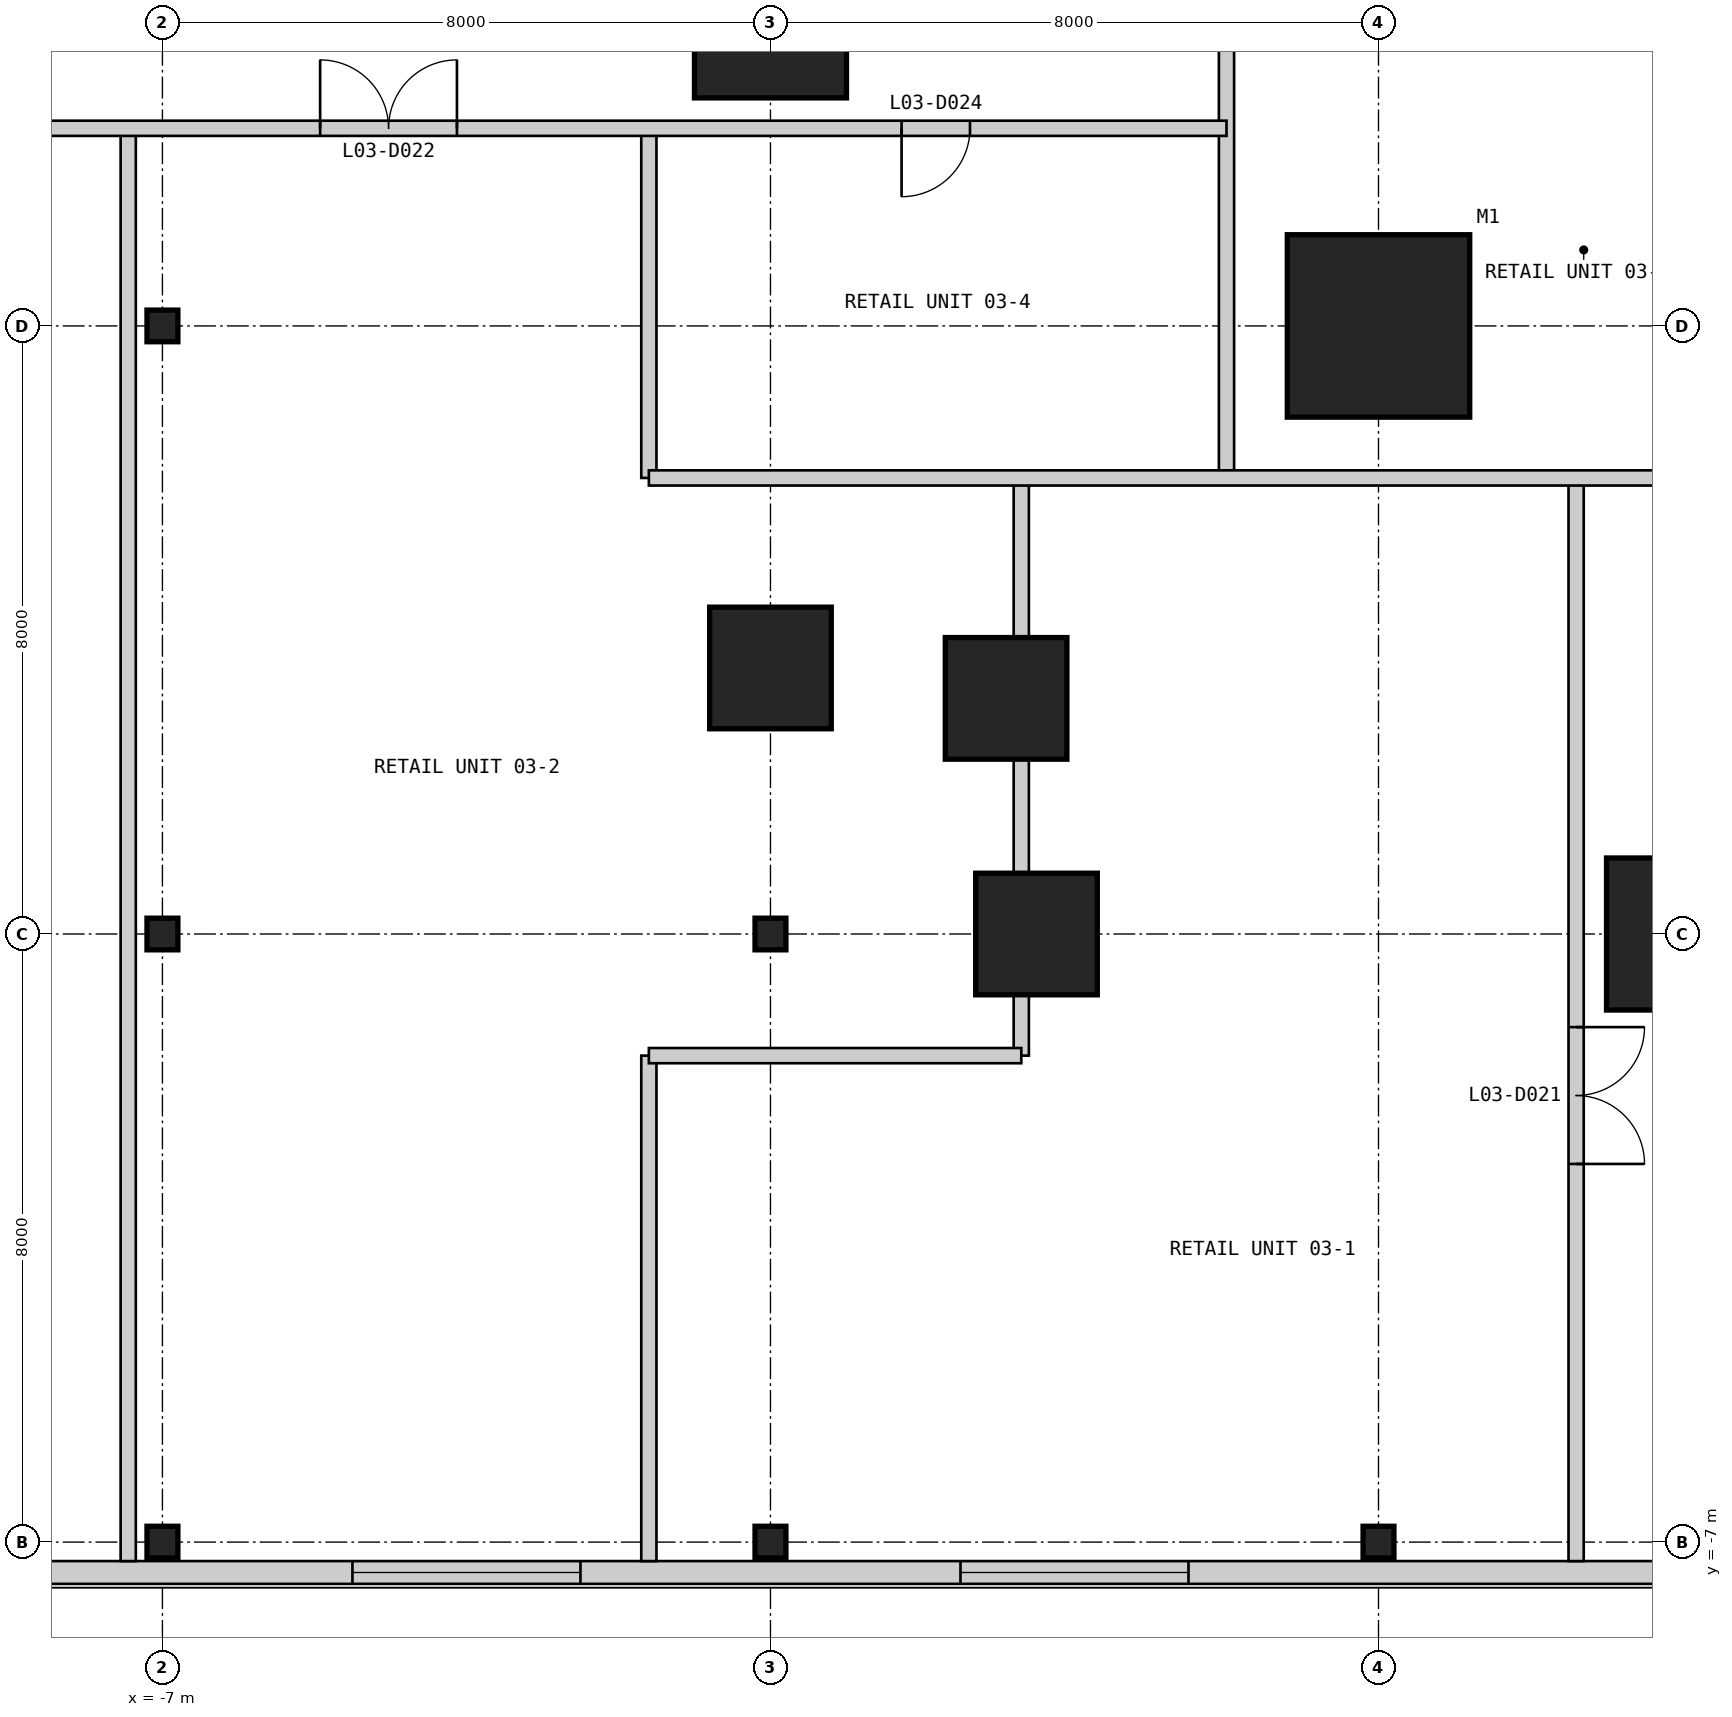
"""IFC4 building model, lengths in metres.
Left out: names, types, materials, properties, quantities, classifications, styles, units other than length and angle.
Written with IfcOpenShell. Run it as: python <this file> out.ifc"""

import sys

from ifc_helpers import new_model, si_unit, direction, frame, frame_2d, origin, origin_2d, place, context, subcontext, project, spatial, rectangle, i_section, extrude, element, fill, save


model = new_model("IFC4")
c1 = context("Model", 3, precision=1e-05, world=origin(), true_north=direction((0.0, 1.0)))
c2 = subcontext(c1, "Body", "Model", "MODEL_VIEW")
j1 = project(units=[si_unit("LENGTHUNIT", "METRE"), si_unit("PLANEANGLEUNIT", "RADIAN")], contexts=[c1])
p1 = place(None, origin())
s1 = spatial("IfcSite", under=j1, at=p1, CompositionType="ELEMENT")
p2 = place(p1, origin())
s2 = spatial("IfcBuilding", under=s1, at=p2, CompositionType="ELEMENT")
p3 = place(p2, frame((0.0, 0.0, 16.6)))
s3 = spatial("IfcBuildingStorey", under=s2, at=p3, CompositionType="ELEMENT", Elevation=16.6)
p4 = place(p3, frame((9.0, 9.0, 0.0), z_axis=(0.0, 0.0, 1.0), x_axis=(1.0, 0.0, 0.0)))
e1 = element("IfcColumn", 1, at=p4, inside=s3, PredefinedType="COLUMN", context=c2, shape_type="SweptSolid", body=[
    extrude(rectangle(XDim=2.4, YDim=2.4, at=origin_2d()), origin(), (0.0, 0.0, 1.0), 4.8),
])
p5 = place(p3, frame((4.5, 1.0, 0.0), z_axis=(0.0, 0.0, 1.0), x_axis=(1.0, 0.0, 0.0)))
e2 = element("IfcColumn", 2, at=p5, inside=s3, PredefinedType="COLUMN", context=c2, shape_type="SweptSolid", body=[
    extrude(rectangle(XDim=1.6, YDim=1.6, at=origin_2d()), origin(), (0.0, 0.0, 1.0), 4.8),
])
for number, where, z_axis, x_axis in (
    (3, (13.0, 1.0, 0.0), (0.0, 0.0, 1.0), (1.0, 0.0, 0.0)),
    (4, (1.0, 13.0, 0.0), (0.0, 0.0, 1.0), (1.0, 0.0, 0.0)),
):
    element("IfcColumn", number, at=place(p3, frame(where, z_axis=z_axis, x_axis=x_axis)), inside=s3, PredefinedType="COLUMN", context=c2, shape_type="SweptSolid", body=[
        extrude(rectangle(XDim=2.0, YDim=2.0, at=origin_2d()), origin(), (0.0, 0.0, 1.0), 4.8),
    ])
for number, where, z_axis, x_axis in (
    (5, (1.0, 4.5, 0.0), (0.0, 0.0, 1.0), (1.0, 0.0, 0.0)),
    (6, (4.1, 4.1, 0.0), (0.0, 0.0, 1.0), (1.0, 0.0, 0.0)),
):
    element("IfcColumn", number, at=place(p3, frame(where, z_axis=z_axis, x_axis=x_axis)), inside=s3, PredefinedType="COLUMN", context=c2, shape_type="SweptSolid", body=[
        extrude(rectangle(XDim=1.6, YDim=1.6, at=origin_2d()), origin(), (0.0, 0.0, 1.0), 4.8),
    ])
for number, where, z_axis, x_axis in (
    (7, (-7.0, -7.0, 0.0), (0.0, 0.0, 1.0), (1.0, 0.0, 0.0)),
    (8, (-7.0, 1.0, 0.0), (0.0, 0.0, 1.0), (1.0, 0.0, 0.0)),
    (9, (-7.0, 9.0, 0.0), (0.0, 0.0, 1.0), (1.0, 0.0, 0.0)),
    (10, (1.0, -7.0, 0.0), (0.0, 0.0, 1.0), (1.0, 0.0, 0.0)),
    (11, (1.0, 1.0, 0.0), (0.0, 0.0, 1.0), (1.0, 0.0, 0.0)),
    (12, (9.0, -7.0, 0.0), (0.0, 0.0, 1.0), (1.0, 0.0, 0.0)),
):
    element("IfcColumn", number, at=place(p3, frame(where, z_axis=z_axis, x_axis=x_axis)), inside=s3, PredefinedType="COLUMN", context=c2, shape_type="SweptSolid", body=[
        extrude(i_section(OverallWidth=0.406, OverallDepth=0.417, WebThickness=0.03, FlangeThickness=0.048, at=origin_2d()), origin(), (0.0, 0.0, 1.0), 4.8),
    ])
p6 = place(p3, frame((-15.55, -7.4, 0.0), z_axis=(0.0, 0.0, 1.0), x_axis=(1.0, 0.0, 0.0)))
e13 = element("IfcWall", 13, at=p6, inside=s3, PredefinedType="SOLIDWALL", context=c2, shape_type="SweptSolid", body=[
    extrude(rectangle(XDim=73.1, YDim=0.3, at=frame_2d((36.55, 0.0))), origin(), (0.0, 0.0, 1.0), 4.5),
])
p7 = place(p6, frame((3.05, 0.0, 0.9)))
e14 = element("IfcOpeningElement", 14, at=p7, cuts=e13, PredefinedType="OPENING", context=c2, shape_type="SweptSolid", body=[
    extrude(rectangle(XDim=3.0, YDim=2.4, at=frame_2d((1.5, 1.2))), frame((0.0, 0.16, 0.0), z_axis=(0.0, -1.0, 0.0), x_axis=(1.0, 0.0, 0.0)), (0.0, 0.0, 1.0), 0.32),
])
p8 = place(p6, frame((11.05, 0.0, 0.9)))
e15 = element("IfcOpeningElement", 15, at=p8, cuts=e13, PredefinedType="OPENING", context=c2, shape_type="SweptSolid", body=[
    extrude(rectangle(XDim=3.0, YDim=2.4, at=frame_2d((1.5, 1.2))), frame((0.0, 0.16, 0.0), z_axis=(0.0, -1.0, 0.0), x_axis=(1.0, 0.0, 0.0)), (0.0, 0.0, 1.0), 0.32),
])
p9 = place(p6, frame((19.05, 0.0, 0.9)))
e16 = element("IfcOpeningElement", 16, at=p9, cuts=e13, PredefinedType="OPENING", context=c2, shape_type="SweptSolid", body=[
    extrude(rectangle(XDim=3.0, YDim=2.4, at=frame_2d((1.5, 1.2))), frame((0.0, 0.16, 0.0), z_axis=(0.0, -1.0, 0.0), x_axis=(1.0, 0.0, 0.0)), (0.0, 0.0, 1.0), 0.32),
])
p10 = place(p6, frame((33.05, 0.0, 0.9)))
e17 = element("IfcOpeningElement", 17, at=p10, cuts=e13, PredefinedType="OPENING", context=c2, shape_type="SweptSolid", body=[
    extrude(rectangle(XDim=3.0, YDim=2.4, at=frame_2d((1.5, 1.2))), frame((0.0, 0.16, 0.0), z_axis=(0.0, -1.0, 0.0), x_axis=(1.0, 0.0, 0.0)), (0.0, 0.0, 1.0), 0.32),
])
p11 = place(p6, frame((45.05, 0.0, 0.9)))
e18 = element("IfcOpeningElement", 18, at=p11, cuts=e13, PredefinedType="OPENING", context=c2, shape_type="SweptSolid", body=[
    extrude(rectangle(XDim=3.0, YDim=2.4, at=frame_2d((1.5, 1.2))), frame((0.0, 0.16, 0.0), z_axis=(0.0, -1.0, 0.0), x_axis=(1.0, 0.0, 0.0)), (0.0, 0.0, 1.0), 0.32),
])
p12 = place(p6, frame((53.55, 0.0, 0.9)))
e19 = element("IfcOpeningElement", 19, at=p12, cuts=e13, PredefinedType="OPENING", context=c2, shape_type="SweptSolid", body=[
    extrude(rectangle(XDim=3.0, YDim=2.4, at=frame_2d((1.5, 1.2))), frame((0.0, 0.16, 0.0), z_axis=(0.0, -1.0, 0.0), x_axis=(1.0, 0.0, 0.0)), (0.0, 0.0, 1.0), 0.32),
])
p13 = place(p6, frame((59.55, 0.0, 0.9)))
e20 = element("IfcOpeningElement", 20, at=p13, cuts=e13, PredefinedType="OPENING", context=c2, shape_type="SweptSolid", body=[
    extrude(rectangle(XDim=3.0, YDim=2.4, at=frame_2d((1.5, 1.2))), frame((0.0, 0.16, 0.0), z_axis=(0.0, -1.0, 0.0), x_axis=(1.0, 0.0, 0.0)), (0.0, 0.0, 1.0), 0.32),
])
p14 = place(p6, frame((67.05, 0.0, 0.9)))
e21 = element("IfcOpeningElement", 21, at=p14, cuts=e13, PredefinedType="OPENING", context=c2, shape_type="SweptSolid", body=[
    extrude(rectangle(XDim=3.0, YDim=2.4, at=frame_2d((1.5, 1.2))), frame((0.0, 0.16, 0.0), z_axis=(0.0, -1.0, 0.0), x_axis=(1.0, 0.0, 0.0)), (0.0, 0.0, 1.0), 0.32),
])
p15 = place(p3, frame((-7.45, -7.25, 0.0), z_axis=(0.0, 0.0, 1.0), x_axis=(0.0, 1.0, 0.0)))
e22 = element("IfcWall", 22, at=p15, inside=s3, PredefinedType="PARTITIONING", context=c2, shape_type="SweptSolid", body=[
    extrude(rectangle(XDim=18.85, YDim=0.2, at=frame_2d((9.425, 0.0))), origin(), (0.0, 0.0, 1.0), 4.5),
])
p16 = place(p3, frame((-0.6, -7.25, 0.0), z_axis=(0.0, 0.0, 1.0), x_axis=(0.0, 1.0, 0.0)))
e23 = element("IfcWall", 23, at=p16, inside=s3, PredefinedType="PARTITIONING", context=c2, shape_type="SweptSolid", body=[
    extrude(rectangle(XDim=6.65, YDim=0.2, at=frame_2d((3.325, 0.0))), origin(), (0.0, 0.0, 1.0), 4.5),
])
p17 = place(p3, frame((-0.6, 7.0, 0.0), z_axis=(0.0, 0.0, 1.0), x_axis=(0.0, 1.0, 0.0)))
e24 = element("IfcWall", 24, at=p17, inside=s3, PredefinedType="PARTITIONING", context=c2, shape_type="SweptSolid", body=[
    extrude(rectangle(XDim=4.6, YDim=0.2, at=frame_2d((2.3, 0.0))), origin(), (0.0, 0.0, 1.0), 4.5),
])
p18 = place(p3, frame((4.3, -0.6, 0.0), z_axis=(0.0, 0.0, 1.0), x_axis=(0.0, 1.0, 0.0)))
e25 = element("IfcWall", 25, at=p18, inside=s3, PredefinedType="PARTITIONING", context=c2, shape_type="SweptSolid", body=[
    extrude(rectangle(XDim=0.8, YDim=0.2, at=frame_2d((0.4, 0.0))), origin(), (0.0, 0.0, 1.0), 4.5),
])
p19 = place(p3, frame((4.3, 1.8, 0.0), z_axis=(0.0, 0.0, 1.0), x_axis=(0.0, 1.0, 0.0)))
e26 = element("IfcWall", 26, at=p19, inside=s3, PredefinedType="PARTITIONING", context=c2, shape_type="SweptSolid", body=[
    extrude(rectangle(XDim=1.5, YDim=0.2, at=frame_2d((0.75, 0.0))), origin(), (0.0, 0.0, 1.0), 3.65),
])
p20 = place(p3, frame((4.3, 4.9, 0.0), z_axis=(0.0, 0.0, 1.0), x_axis=(0.0, 1.0, 0.0)))
e27 = element("IfcWall", 27, at=p20, inside=s3, PredefinedType="PARTITIONING", context=c2, shape_type="SweptSolid", body=[
    extrude(rectangle(XDim=2.1, YDim=0.2, at=frame_2d((1.05, 0.0))), origin(), (0.0, 0.0, 1.0), 4.5),
])
p21 = place(p3, frame((7.0, 7.0, 0.0), z_axis=(0.0, 0.0, 1.0), x_axis=(0.0, 1.0, 0.0)))
e28 = element("IfcWall", 28, at=p21, inside=s3, PredefinedType="PARTITIONING", context=c2, shape_type="SweptSolid", body=[
    extrude(rectangle(XDim=6.0, YDim=0.2, at=frame_2d((3.0, 0.0))), origin(), (0.0, 0.0, 1.0), 4.5),
])
p22 = place(p3, frame((11.6, -7.25, 0.0), z_axis=(0.0, 0.0, 1.0), x_axis=(0.0, 1.0, 0.0)))
e29 = element("IfcWall", 29, at=p22, inside=s3, PredefinedType="PARTITIONING", context=c2, shape_type="SweptSolid", body=[
    extrude(rectangle(XDim=14.25, YDim=0.2, at=frame_2d((7.125, 0.0))), origin(), (0.0, 0.0, 1.0), 4.5),
])
p23 = place(p22, frame((5.225, 0.0, 0.0)))
e30 = element("IfcOpeningElement", 30, at=p23, cuts=e29, PredefinedType="OPENING", context=c2, shape_type="SweptSolid", body=[
    extrude(rectangle(XDim=1.8, YDim=2.4, at=frame_2d((0.9, 1.2))), frame((0.0, 0.11, 0.0), z_axis=(0.0, -1.0, 0.0), x_axis=(1.0, 0.0, 0.0)), (0.0, 0.0, 1.0), 0.22),
])
p24 = place(p3, frame((-0.6, -0.6, 0.0), z_axis=(0.0, 0.0, 1.0), x_axis=(1.0, 0.0, 0.0)))
e31 = element("IfcWall", 31, at=p24, inside=s3, PredefinedType="PARTITIONING", context=c2, shape_type="SweptSolid", body=[
    extrude(rectangle(XDim=4.9, YDim=0.2, at=frame_2d((2.45, 0.0))), origin(), (0.0, 0.0, 1.0), 4.5),
])
p25 = place(p3, frame((-0.6, 7.0, 0.0), z_axis=(0.0, 0.0, 1.0), x_axis=(1.0, 0.0, 0.0)))
e32 = element("IfcWall", 32, at=p25, inside=s3, PredefinedType="PARTITIONING", context=c2, shape_type="SweptSolid", body=[
    extrude(rectangle(XDim=17.0, YDim=0.2, at=frame_2d((8.5, 0.0))), origin(), (0.0, 0.0, 1.0), 4.5),
])
p26 = place(p25, frame((14.125, 0.0, 0.0)))
e33 = element("IfcOpeningElement", 33, at=p26, cuts=e32, PredefinedType="OPENING", context=c2, shape_type="SweptSolid", body=[
    extrude(rectangle(XDim=0.9, YDim=2.2, at=frame_2d((0.45, 1.1))), frame((0.0, 0.11, 0.0), z_axis=(0.0, -1.0, 0.0), x_axis=(1.0, 0.0, 0.0)), (0.0, 0.0, 1.0), 0.22),
])
p27 = place(p3, frame((-15.25, 11.6, 0.0), z_axis=(0.0, 0.0, 1.0), x_axis=(1.0, 0.0, 0.0)))
e34 = element("IfcWall", 34, at=p27, inside=s3, PredefinedType="PARTITIONING", context=c2, shape_type="SweptSolid", body=[
    extrude(rectangle(XDim=22.25, YDim=0.2, at=frame_2d((11.125, 0.0))), origin(), (0.0, 0.0, 1.0), 4.5),
])
p28 = place(p27, frame((10.325, 0.0, 0.0)))
e35 = element("IfcOpeningElement", 35, at=p28, cuts=e34, PredefinedType="OPENING", context=c2, shape_type="SweptSolid", body=[
    extrude(rectangle(XDim=1.8, YDim=2.4, at=frame_2d((0.9, 1.2))), frame((0.0, 0.11, 0.0), z_axis=(0.0, -1.0, 0.0), x_axis=(1.0, 0.0, 0.0)), (0.0, 0.0, 1.0), 0.22),
])
p29 = place(p27, frame((3.025, 0.0, 0.0)))
e36 = element("IfcOpeningElement", 36, at=p29, cuts=e34, PredefinedType="OPENING", context=c2, shape_type="SweptSolid", body=[
    extrude(rectangle(XDim=1.8, YDim=2.4, at=frame_2d((0.9, 1.2))), frame((0.0, 0.11, 0.0), z_axis=(0.0, -1.0, 0.0), x_axis=(1.0, 0.0, 0.0)), (0.0, 0.0, 1.0), 0.22),
])
p30 = place(p27, frame((17.975, 0.0, 0.0)))
e37 = element("IfcOpeningElement", 37, at=p30, cuts=e34, PredefinedType="OPENING", context=c2, shape_type="SweptSolid", body=[
    extrude(rectangle(XDim=0.9, YDim=2.2, at=frame_2d((0.45, 1.1))), frame((0.0, 0.11, 0.0), z_axis=(0.0, -1.0, 0.0), x_axis=(1.0, 0.0, 0.0)), (0.0, 0.0, 1.0), 0.22),
])
p31 = place(p8, origin())
e38 = element("IfcWindow", 38, at=p31, inside=s3, PartitioningType="SINGLE_PANEL", PredefinedType="WINDOW", context=c2, shape_type="SweptSolid", body=[
    extrude(rectangle(XDim=3.0, YDim=2.4, at=frame_2d((1.5, 1.2))), frame((0.0, 0.03, 0.0), z_axis=(0.0, -1.0, 0.0), x_axis=(1.0, 0.0, 0.0)), (0.0, 0.0, 1.0), 0.06),
])
fill(e15, e38)
p32 = place(p9, origin())
e39 = element("IfcWindow", 39, at=p32, inside=s3, PartitioningType="SINGLE_PANEL", PredefinedType="WINDOW", context=c2, shape_type="SweptSolid", body=[
    extrude(rectangle(XDim=3.0, YDim=2.4, at=frame_2d((1.5, 1.2))), frame((0.0, 0.03, 0.0), z_axis=(0.0, -1.0, 0.0), x_axis=(1.0, 0.0, 0.0)), (0.0, 0.0, 1.0), 0.06),
])
fill(e16, e39)
p33 = place(p23, frame((1.8, 0.0, 0.0), z_axis=(0.0, 0.0, 1.0), x_axis=(-1.0, 0.0, 0.0)))
e40 = element("IfcDoor", 40, at=p33, inside=s3, OperationType="DOUBLE_DOOR_SINGLE_SWING", PredefinedType="DOOR", context=c2, shape_type="SweptSolid", body=[
    extrude(rectangle(XDim=1.8, YDim=2.4, at=frame_2d((0.9, 1.2))), frame((0.0, 0.025, 0.0), z_axis=(0.0, -1.0, 0.0), x_axis=(1.0, 0.0, 0.0)), (0.0, 0.0, 1.0), 0.05),
])
fill(e30, e40)
p34 = place(p28, origin())
e41 = element("IfcDoor", 41, at=p34, inside=s3, OperationType="DOUBLE_DOOR_SINGLE_SWING", PredefinedType="DOOR", context=c2, shape_type="SweptSolid", body=[
    extrude(rectangle(XDim=1.8, YDim=2.4, at=frame_2d((0.9, 1.2))), frame((0.0, 0.025, 0.0), z_axis=(0.0, -1.0, 0.0), x_axis=(1.0, 0.0, 0.0)), (0.0, 0.0, 1.0), 0.05),
])
fill(e35, e41)
p35 = place(p30, frame((0.9, 0.0, 0.0), z_axis=(0.0, 0.0, 1.0), x_axis=(-1.0, 0.0, 0.0)))
e42 = element("IfcDoor", 42, at=p35, inside=s3, OperationType="SINGLE_SWING_RIGHT", PredefinedType="DOOR", context=c2, shape_type="SweptSolid", body=[
    extrude(rectangle(XDim=0.9, YDim=2.2, at=frame_2d((0.45, 1.1))), frame((0.0, 0.025, 0.0), z_axis=(0.0, -1.0, 0.0), x_axis=(1.0, 0.0, 0.0)), (0.0, 0.0, 1.0), 0.05),
])
fill(e37, e42)
save(model, sys.argv[1])
